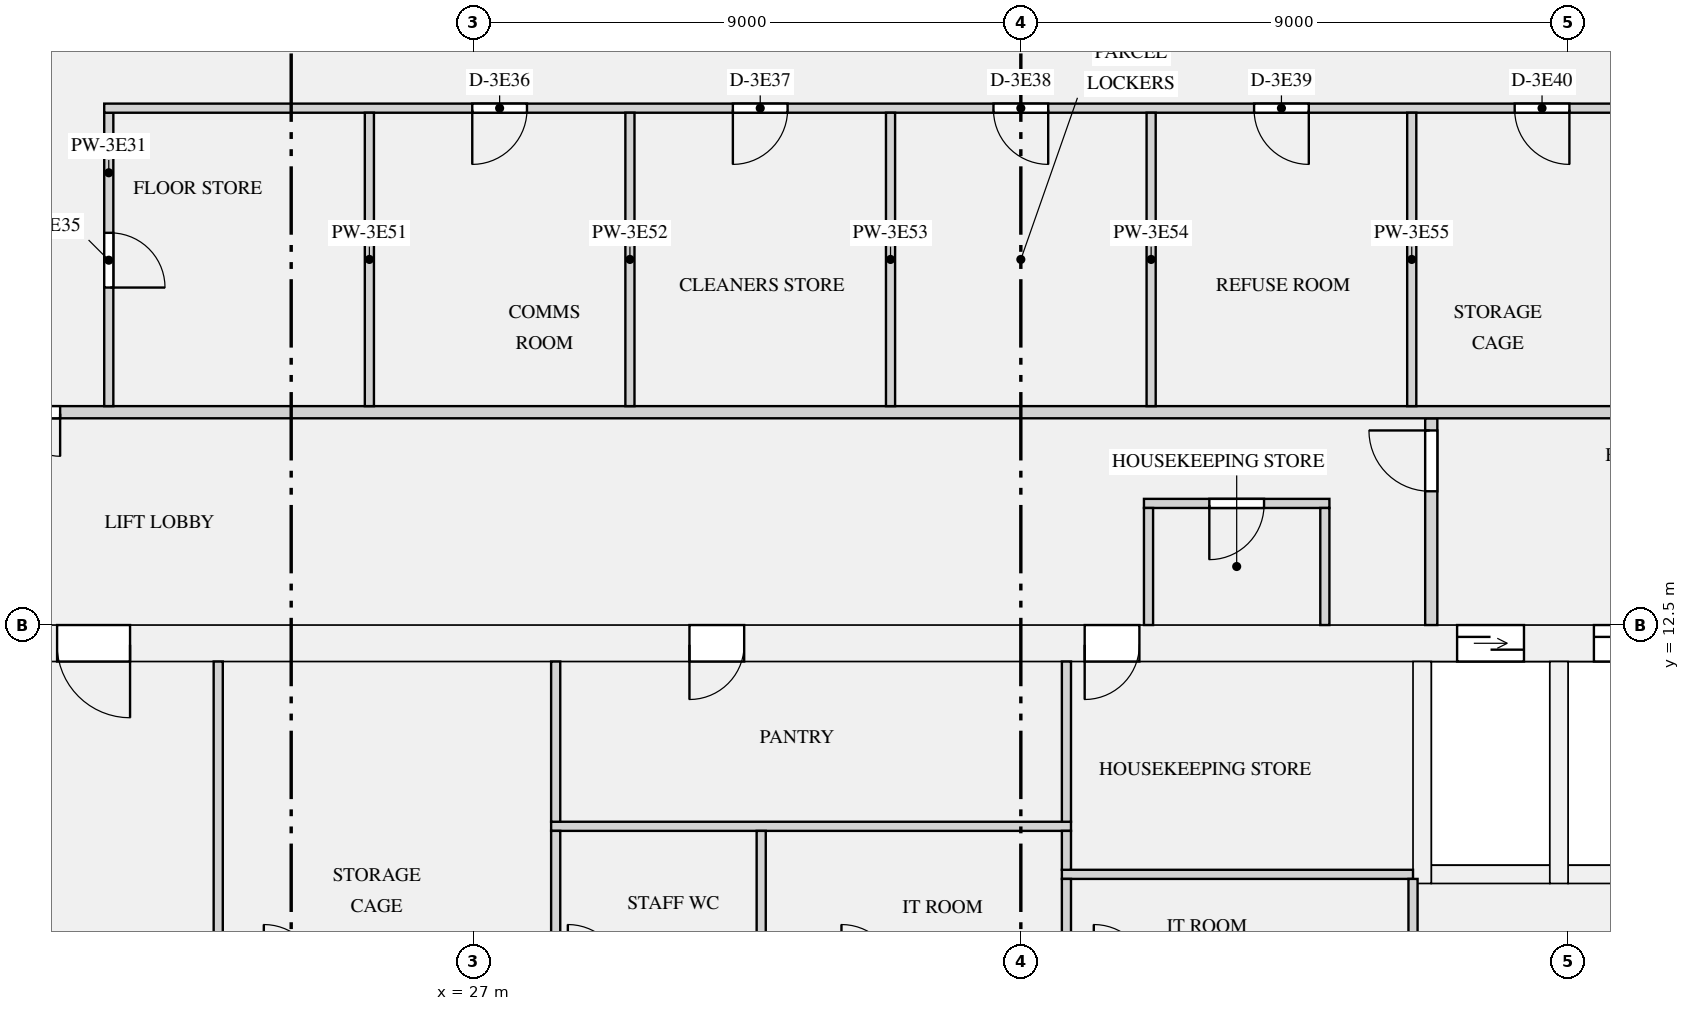
"""IFC4 building model, lengths in metres.
Left out: names, types, materials, properties, quantities, classifications, styles, units other than length and angle.
Written with IfcOpenShell. Run it as: python <this file> out.ifc"""

import sys

from ifc_helpers import new_model, si_unit, direction, frame, frame_2d, origin, place, context, subcontext, project, spatial, rectangle, extrude, element, fill, save


model = new_model("IFC4")
c1 = context("Model", 3, precision=1e-05, world=origin(), true_north=direction((0.0, 1.0)))
c2 = subcontext(c1, "Body", "Model", "MODEL_VIEW")
j1 = project(units=[si_unit("LENGTHUNIT", "METRE"), si_unit("PLANEANGLEUNIT", "RADIAN")], contexts=[c1])
p1 = place(None, origin())
s1 = spatial("IfcSite", under=j1, at=p1, CompositionType="ELEMENT")
p2 = place(p1, origin())
s2 = spatial("IfcBuilding", under=s1, at=p2, CompositionType="ELEMENT")
p3 = place(p2, frame((0.0, 0.0, 172.8)))
s3 = spatial("IfcBuildingStorey", under=s2, at=p3, CompositionType="ELEMENT", Elevation=172.8)
p4 = place(p3, frame((18.7, 12.2, 0.0), z_axis=(0.0, 0.0, 1.0), x_axis=(1.0, 0.0, 0.0)))
e1 = element("IfcWall", 1, at=p4, inside=s3, PredefinedType="SHEAR", context=c2, shape_type="SweptSolid", body=[
    extrude(rectangle(XDim=34.6, YDim=0.6, at=frame_2d((17.3, 0.0))), origin(), (0.0, 0.0, 1.0), 3.15),
])
p5 = place(p4, frame((24.475, 0.0, 0.0)))
e2 = element("IfcOpeningElement", 2, at=p5, cuts=e1, PredefinedType="OPENING", context=c2, shape_type="SweptSolid", body=[
    extrude(rectangle(XDim=1.1, YDim=2.1, at=frame_2d((0.55, 1.05))), frame((0.0, 0.31, 0.0), z_axis=(0.0, -1.0, 0.0), x_axis=(1.0, 0.0, 0.0)), (0.0, 0.0, 1.0), 0.62),
])
p6 = place(p4, frame((26.725, 0.0, 0.0)))
e3 = element("IfcOpeningElement", 3, at=p6, cuts=e1, PredefinedType="OPENING", context=c2, shape_type="SweptSolid", body=[
    extrude(rectangle(XDim=1.1, YDim=2.1, at=frame_2d((0.55, 1.05))), frame((0.0, 0.31, 0.0), z_axis=(0.0, -1.0, 0.0), x_axis=(1.0, 0.0, 0.0)), (0.0, 0.0, 1.0), 0.62),
])
p7 = place(p4, frame((28.975, 0.0, 0.0)))
e4 = element("IfcOpeningElement", 4, at=p7, cuts=e1, PredefinedType="OPENING", context=c2, shape_type="SweptSolid", body=[
    extrude(rectangle(XDim=1.1, YDim=2.1, at=frame_2d((0.55, 1.05))), frame((0.0, 0.31, 0.0), z_axis=(0.0, -1.0, 0.0), x_axis=(1.0, 0.0, 0.0)), (0.0, 0.0, 1.0), 0.62),
])
p8 = place(p4, frame((11.85, 0.0, 0.0)))
e5 = element("IfcOpeningElement", 5, at=p8, cuts=e1, PredefinedType="OPENING", context=c2, shape_type="SweptSolid", body=[
    extrude(rectangle(XDim=0.9, YDim=2.1, at=frame_2d((0.45, 1.05))), frame((0.0, 0.31, 0.0), z_axis=(0.0, -1.0, 0.0), x_axis=(1.0, 0.0, 0.0)), (0.0, 0.0, 1.0), 0.62),
])
p9 = place(p4, frame((18.35, 0.0, 0.0)))
e6 = element("IfcOpeningElement", 6, at=p9, cuts=e1, PredefinedType="OPENING", context=c2, shape_type="SweptSolid", body=[
    extrude(rectangle(XDim=0.9, YDim=2.1, at=frame_2d((0.45, 1.05))), frame((0.0, 0.31, 0.0), z_axis=(0.0, -1.0, 0.0), x_axis=(1.0, 0.0, 0.0)), (0.0, 0.0, 1.0), 0.62),
])
p10 = place(p4, frame((1.45, 0.0, 0.0)))
e7 = element("IfcOpeningElement", 7, at=p10, cuts=e1, PredefinedType="OPENING", context=c2, shape_type="SweptSolid", body=[
    extrude(rectangle(XDim=1.2, YDim=2.1, at=frame_2d((0.6, 1.05))), frame((0.0, 0.31, 0.0), z_axis=(0.0, -1.0, 0.0), x_axis=(1.0, 0.0, 0.0)), (0.0, 0.0, 1.0), 0.62),
])
p11 = place(p4, frame((31.95, 0.0, 0.0)))
e8 = element("IfcOpeningElement", 8, at=p11, cuts=e1, PredefinedType="OPENING", context=c2, shape_type="SweptSolid", body=[
    extrude(rectangle(XDim=1.2, YDim=2.1, at=frame_2d((0.6, 1.05))), frame((0.0, 0.31, 0.0), z_axis=(0.0, -1.0, 0.0), x_axis=(1.0, 0.0, 0.0)), (0.0, 0.0, 1.0), 0.62),
])
p12 = place(p3, frame((42.75, 8.4, 0.0), z_axis=(0.0, 0.0, 1.0), x_axis=(1.0, 0.0, 0.0)))
e9 = element("IfcWall", 9, at=p12, inside=s3, PredefinedType="SHEAR", context=c2, shape_type="SweptSolid", body=[
    extrude(rectangle(XDim=1.95, YDim=0.3, at=frame_2d((0.975, 0.0))), origin(), (0.0, 0.0, 1.0), 3.15),
])
p13 = place(p3, frame((42.6, 8.25, 0.0), z_axis=(0.0, 0.0, 1.0), x_axis=(0.0, 1.0, 0.0)))
e10 = element("IfcWall", 10, at=p13, inside=s3, PredefinedType="SHEAR", context=c2, shape_type="SweptSolid", body=[
    extrude(rectangle(XDim=3.65, YDim=0.3, at=frame_2d((1.825, 0.0))), origin(), (0.0, 0.0, 1.0), 3.15),
])
p14 = place(p3, frame((45.0, 8.4, 0.0), z_axis=(0.0, 0.0, 1.0), x_axis=(1.0, 0.0, 0.0)))
e11 = element("IfcWall", 11, at=p14, inside=s3, PredefinedType="SHEAR", context=c2, shape_type="SweptSolid", body=[
    extrude(rectangle(XDim=1.95, YDim=0.3, at=frame_2d((0.975, 0.0))), origin(), (0.0, 0.0, 1.0), 3.15),
])
p15 = place(p3, frame((44.85, 8.25, 0.0), z_axis=(0.0, 0.0, 1.0), x_axis=(0.0, 1.0, 0.0)))
e12 = element("IfcWall", 12, at=p15, inside=s3, PredefinedType="SHEAR", context=c2, shape_type="SweptSolid", body=[
    extrude(rectangle(XDim=3.65, YDim=0.3, at=frame_2d((1.825, 0.0))), origin(), (0.0, 0.0, 1.0), 3.15),
])
p16 = place(p3, frame((36.675, 8.4, 0.0), z_axis=(0.0, 0.0, 1.0), x_axis=(1.0, 0.0, 0.0)))
e13 = element("IfcWall", 13, at=p16, inside=s3, PredefinedType="PARTITIONING", context=c2, shape_type="SweptSolid", body=[
    extrude(rectangle(XDim=5.775, YDim=0.15, at=frame_2d((2.887, 0.0))), origin(), (0.0, 0.0, 1.0), 2.83),
])
p17 = place(p3, frame((28.275, 9.19, 0.0), z_axis=(0.0, 0.0, 1.0), x_axis=(1.0, 0.0, 0.0)))
e14 = element("IfcWall", 14, at=p17, inside=s3, PredefinedType="PARTITIONING", context=c2, shape_type="SweptSolid", body=[
    extrude(rectangle(XDim=8.55, YDim=0.15, at=frame_2d((4.275, 0.0))), origin(), (0.0, 0.0, 1.0), 2.83),
])
p18 = place(p3, frame((38.025, 14.5, 0.0), z_axis=(0.0, 0.0, 1.0), x_axis=(1.0, 0.0, 0.0)))
e15 = element("IfcWall", 15, at=p18, inside=s3, PredefinedType="PARTITIONING", context=c2, shape_type="SweptSolid", body=[
    extrude(rectangle(XDim=3.05, YDim=0.15, at=frame_2d((1.525, 0.0))), origin(), (0.0, 0.0, 1.0), 2.83),
])
p19 = place(p18, frame((1.075, 0.0, 0.0)))
e16 = element("IfcOpeningElement", 16, at=p19, cuts=e15, PredefinedType="OPENING", context=c2, shape_type="SweptSolid", body=[
    extrude(rectangle(XDim=0.9, YDim=2.1, at=frame_2d((0.45, 1.05))), frame((0.0, 0.085, 0.0), z_axis=(0.0, -1.0, 0.0), x_axis=(1.0, 0.0, 0.0)), (0.0, 0.0, 1.0), 0.17),
])
p20 = place(p3, frame((42.45, 6.65, 0.0), z_axis=(0.0, 0.0, 1.0), x_axis=(0.0, 1.0, 0.0)))
e17 = element("IfcWall", 17, at=p20, inside=s3, PredefinedType="PARTITIONING", context=c2, shape_type="SweptSolid", body=[
    extrude(rectangle(XDim=1.675, YDim=0.15, at=frame_2d((0.837, 0.0))), origin(), (0.0, 0.0, 1.0), 2.83),
])
p21 = place(p3, frame((22.8, 6.725, 0.0), z_axis=(0.0, 0.0, 1.0), x_axis=(0.0, 1.0, 0.0)))
e18 = element("IfcWall", 18, at=p21, inside=s3, PredefinedType="PARTITIONING", context=c2, shape_type="SweptSolid", body=[
    extrude(rectangle(XDim=5.175, YDim=0.15, at=frame_2d((2.587, 0.0))), origin(), (0.0, 0.0, 1.0), 2.83),
])
for number, where, z_axis, x_axis in (
    (19, (28.35, 6.725, 0.0), (0.0, 0.0, 1.0), (0.0, 1.0, 0.0)),
    (20, (31.73, 6.725, 0.0), (0.0, 0.0, 1.0), (0.0, 1.0, 0.0)),
):
    element("IfcWall", number, at=place(p3, frame(where, z_axis=z_axis, x_axis=x_axis)), inside=s3, PredefinedType="PARTITIONING", context=c2, shape_type="SweptSolid", body=[
        extrude(rectangle(XDim=2.39, YDim=0.15, at=frame_2d((1.195, 0.0))), origin(), (0.0, 0.0, 1.0), 2.83),
    ])
p22 = place(p3, frame((36.75, 6.725, 0.0), z_axis=(0.0, 0.0, 1.0), x_axis=(0.0, 1.0, 0.0)))
e21 = element("IfcWall", 21, at=p22, inside=s3, PredefinedType="PARTITIONING", context=c2, shape_type="SweptSolid", body=[
    extrude(rectangle(XDim=1.6, YDim=0.15, at=frame_2d((0.8, 0.0))), origin(), (0.0, 0.0, 1.0), 2.83),
])
p23 = place(p3, frame((36.75, 8.475, 0.0), z_axis=(0.0, 0.0, 1.0), x_axis=(0.0, 1.0, 0.0)))
e22 = element("IfcWall", 22, at=p23, inside=s3, PredefinedType="PARTITIONING", context=c2, shape_type="SweptSolid", body=[
    extrude(rectangle(XDim=0.64, YDim=0.15, at=frame_2d((0.32, 0.0))), origin(), (0.0, 0.0, 1.0), 2.83),
])
for number, where, z_axis, x_axis in (
    (23, (28.35, 9.265, 0.0), (0.0, 0.0, 1.0), (0.0, 1.0, 0.0)),
    (24, (36.75, 9.265, 0.0), (0.0, 0.0, 1.0), (0.0, 1.0, 0.0)),
):
    element("IfcWall", number, at=place(p3, frame(where, z_axis=z_axis, x_axis=x_axis)), inside=s3, PredefinedType="PARTITIONING", context=c2, shape_type="SweptSolid", body=[
        extrude(rectangle(XDim=2.635, YDim=0.15, at=frame_2d((1.317, 0.0))), origin(), (0.0, 0.0, 1.0), 2.83),
    ])
for number, where, z_axis, x_axis in (
    (25, (38.1, 12.5, 0.0), (0.0, 0.0, 1.0), (0.0, 1.0, 0.0)),
    (26, (41.0, 12.5, 0.0), (0.0, 0.0, 1.0), (0.0, 1.0, 0.0)),
):
    element("IfcWall", number, at=place(p3, frame(where, z_axis=z_axis, x_axis=x_axis)), inside=s3, PredefinedType="PARTITIONING", context=c2, shape_type="SweptSolid", body=[
        extrude(rectangle(XDim=1.925, YDim=0.15, at=frame_2d((0.962, 0.0))), origin(), (0.0, 0.0, 1.0), 2.83),
    ])
p24 = place(p3, frame((42.75, 12.5, 0.0), z_axis=(0.0, 0.0, 1.0), x_axis=(0.0, 1.0, 0.0)))
e27 = element("IfcWall", 27, at=p24, inside=s3, PredefinedType="PARTITIONING", context=c2, shape_type="SweptSolid", body=[
    extrude(rectangle(XDim=3.4, YDim=0.2, at=frame_2d((1.7, 0.0))), origin(), (0.0, 0.0, 1.0), 2.83),
])
p25 = place(p24, frame((2.2, 0.0, 0.0)))
e28 = element("IfcOpeningElement", 28, at=p25, cuts=e27, PredefinedType="OPENING", context=c2, shape_type="SweptSolid", body=[
    extrude(rectangle(XDim=1.0, YDim=2.1, at=frame_2d((0.5, 1.05))), frame((0.0, 0.11, 0.0), z_axis=(0.0, -1.0, 0.0), x_axis=(1.0, 0.0, 0.0)), (0.0, 0.0, 1.0), 0.22),
])
p26 = place(p3, frame((20.925, 21.0, 0.0), z_axis=(0.0, 0.0, 1.0), x_axis=(1.0, 0.0, 0.0)))
e29 = element("IfcWall", 29, at=p26, inside=s3, PredefinedType="PARTITIONING", context=c2, shape_type="SweptSolid", body=[
    extrude(rectangle(XDim=30.15, YDim=0.15, at=frame_2d((15.075, 0.0))), origin(), (0.0, 0.0, 1.0), 2.83),
])
p27 = place(p26, frame((6.053, 0.0, 0.0)))
e30 = element("IfcOpeningElement", 30, at=p27, cuts=e29, PredefinedType="OPENING", context=c2, shape_type="SweptSolid", body=[
    extrude(rectangle(XDim=0.9, YDim=2.1, at=frame_2d((0.45, 1.05))), frame((0.0, 0.085, 0.0), z_axis=(0.0, -1.0, 0.0), x_axis=(1.0, 0.0, 0.0)), (0.0, 0.0, 1.0), 0.17),
])
p28 = place(p26, frame((10.339, 0.0, 0.0)))
e31 = element("IfcOpeningElement", 31, at=p28, cuts=e29, PredefinedType="OPENING", context=c2, shape_type="SweptSolid", body=[
    extrude(rectangle(XDim=0.9, YDim=2.1, at=frame_2d((0.45, 1.05))), frame((0.0, 0.085, 0.0), z_axis=(0.0, -1.0, 0.0), x_axis=(1.0, 0.0, 0.0)), (0.0, 0.0, 1.0), 0.17),
])
p29 = place(p26, frame((14.625, 0.0, 0.0)))
e32 = element("IfcOpeningElement", 32, at=p29, cuts=e29, PredefinedType="OPENING", context=c2, shape_type="SweptSolid", body=[
    extrude(rectangle(XDim=0.9, YDim=2.1, at=frame_2d((0.45, 1.05))), frame((0.0, 0.085, 0.0), z_axis=(0.0, -1.0, 0.0), x_axis=(1.0, 0.0, 0.0)), (0.0, 0.0, 1.0), 0.17),
])
p30 = place(p26, frame((18.911, 0.0, 0.0)))
e33 = element("IfcOpeningElement", 33, at=p30, cuts=e29, PredefinedType="OPENING", context=c2, shape_type="SweptSolid", body=[
    extrude(rectangle(XDim=0.9, YDim=2.1, at=frame_2d((0.45, 1.05))), frame((0.0, 0.085, 0.0), z_axis=(0.0, -1.0, 0.0), x_axis=(1.0, 0.0, 0.0)), (0.0, 0.0, 1.0), 0.17),
])
p31 = place(p26, frame((23.197, 0.0, 0.0)))
e34 = element("IfcOpeningElement", 34, at=p31, cuts=e29, PredefinedType="OPENING", context=c2, shape_type="SweptSolid", body=[
    extrude(rectangle(XDim=0.9, YDim=2.1, at=frame_2d((0.45, 1.05))), frame((0.0, 0.085, 0.0), z_axis=(0.0, -1.0, 0.0), x_axis=(1.0, 0.0, 0.0)), (0.0, 0.0, 1.0), 0.17),
])
p32 = place(p3, frame((17.9, 16.0, 0.0), z_axis=(0.0, 0.0, 1.0), x_axis=(1.0, 0.0, 0.0)))
e35 = element("IfcWall", 35, at=p32, inside=s3, PredefinedType="PARTITIONING", context=c2, shape_type="SweptSolid", body=[
    extrude(rectangle(XDim=36.2, YDim=0.2, at=frame_2d((18.1, 0.0))), origin(), (0.0, 0.0, 1.0), 2.83),
])
p33 = place(p32, frame((0.9, 0.0, 0.0)))
e36 = element("IfcOpeningElement", 36, at=p33, cuts=e35, PredefinedType="OPENING", context=c2, shape_type="SweptSolid", body=[
    extrude(rectangle(XDim=1.4, YDim=2.1, at=frame_2d((0.7, 1.05))), frame((0.0, 0.11, 0.0), z_axis=(0.0, -1.0, 0.0), x_axis=(1.0, 0.0, 0.0)), (0.0, 0.0, 1.0), 0.22),
])
p34 = place(p32, frame((33.9, 0.0, 0.0)))
e37 = element("IfcOpeningElement", 37, at=p34, cuts=e35, PredefinedType="OPENING", context=c2, shape_type="SweptSolid", body=[
    extrude(rectangle(XDim=1.4, YDim=2.1, at=frame_2d((0.7, 1.05))), frame((0.0, 0.11, 0.0), z_axis=(0.0, -1.0, 0.0), x_axis=(1.0, 0.0, 0.0)), (0.0, 0.0, 1.0), 0.22),
])
p35 = place(p3, frame((21.0, 16.1, 0.0), z_axis=(0.0, 0.0, 1.0), x_axis=(0.0, 1.0, 0.0)))
e38 = element("IfcWall", 38, at=p35, inside=s3, PredefinedType="PARTITIONING", context=c2, shape_type="SweptSolid", body=[
    extrude(rectangle(XDim=4.825, YDim=0.15, at=frame_2d((2.413, 0.0))), origin(), (0.0, 0.0, 1.0), 2.83),
])
p36 = place(p35, frame((1.95, 0.0, 0.0)))
e39 = element("IfcOpeningElement", 39, at=p36, cuts=e38, PredefinedType="OPENING", context=c2, shape_type="SweptSolid", body=[
    extrude(rectangle(XDim=0.9, YDim=2.1, at=frame_2d((0.45, 1.05))), frame((0.0, 0.085, 0.0), z_axis=(0.0, -1.0, 0.0), x_axis=(1.0, 0.0, 0.0)), (0.0, 0.0, 1.0), 0.17),
])
for number, where, z_axis, x_axis in (
    (40, (25.286, 16.1, 0.0), (0.0, 0.0, 1.0), (0.0, 1.0, 0.0)),
    (41, (29.571, 16.1, 0.0), (0.0, 0.0, 1.0), (0.0, 1.0, 0.0)),
    (42, (33.857, 16.1, 0.0), (0.0, 0.0, 1.0), (0.0, 1.0, 0.0)),
    (43, (38.143, 16.1, 0.0), (0.0, 0.0, 1.0), (0.0, 1.0, 0.0)),
    (44, (42.429, 16.1, 0.0), (0.0, 0.0, 1.0), (0.0, 1.0, 0.0)),
):
    element("IfcWall", number, at=place(p3, frame(where, z_axis=z_axis, x_axis=x_axis)), inside=s3, PredefinedType="PARTITIONING", context=c2, shape_type="SweptSolid", body=[
        extrude(rectangle(XDim=4.825, YDim=0.15, at=frame_2d((2.413, 0.0))), origin(), (0.0, 0.0, 1.0), 2.83),
    ])
p37 = place(p5, origin())
e45 = element("IfcDoor", 45, at=p37, inside=s3, OperationType="DOUBLE_DOOR_SLIDING", PredefinedType="DOOR", context=c2, shape_type="SweptSolid", body=[
    extrude(rectangle(XDim=1.1, YDim=2.1, at=frame_2d((0.55, 1.05))), frame((0.0, 0.025, 0.0), z_axis=(0.0, -1.0, 0.0), x_axis=(1.0, 0.0, 0.0)), (0.0, 0.0, 1.0), 0.05),
])
fill(e2, e45)
p38 = place(p6, origin())
e46 = element("IfcDoor", 46, at=p38, inside=s3, OperationType="DOUBLE_DOOR_SLIDING", PredefinedType="DOOR", context=c2, shape_type="SweptSolid", body=[
    extrude(rectangle(XDim=1.1, YDim=2.1, at=frame_2d((0.55, 1.05))), frame((0.0, 0.025, 0.0), z_axis=(0.0, -1.0, 0.0), x_axis=(1.0, 0.0, 0.0)), (0.0, 0.0, 1.0), 0.05),
])
fill(e3, e46)
p39 = place(p19, frame((0.9, 0.0, 0.0), z_axis=(0.0, 0.0, 1.0), x_axis=(-1.0, 0.0, 0.0)))
e47 = element("IfcDoor", 47, at=p39, inside=s3, OperationType="SINGLE_SWING_RIGHT", PredefinedType="DOOR", context=c2, shape_type="SweptSolid", body=[
    extrude(rectangle(XDim=0.9, YDim=2.1, at=frame_2d((0.45, 1.05))), frame((0.0, 0.025, 0.0), z_axis=(0.0, -1.0, 0.0), x_axis=(1.0, 0.0, 0.0)), (0.0, 0.0, 1.0), 0.05),
])
fill(e16, e47)
p40 = place(p8, frame((0.9, 0.0, 0.0), z_axis=(0.0, 0.0, 1.0), x_axis=(-1.0, 0.0, 0.0)))
e48 = element("IfcDoor", 48, at=p40, inside=s3, OperationType="SINGLE_SWING_RIGHT", PredefinedType="DOOR", context=c2, shape_type="SweptSolid", body=[
    extrude(rectangle(XDim=0.9, YDim=2.1, at=frame_2d((0.45, 1.05))), frame((0.0, 0.025, 0.0), z_axis=(0.0, -1.0, 0.0), x_axis=(1.0, 0.0, 0.0)), (0.0, 0.0, 1.0), 0.05),
])
fill(e5, e48)
p41 = place(p9, frame((0.9, 0.0, 0.0), z_axis=(0.0, 0.0, 1.0), x_axis=(-1.0, 0.0, 0.0)))
e49 = element("IfcDoor", 49, at=p41, inside=s3, OperationType="SINGLE_SWING_RIGHT", PredefinedType="DOOR", context=c2, shape_type="SweptSolid", body=[
    extrude(rectangle(XDim=0.9, YDim=2.1, at=frame_2d((0.45, 1.05))), frame((0.0, 0.025, 0.0), z_axis=(0.0, -1.0, 0.0), x_axis=(1.0, 0.0, 0.0)), (0.0, 0.0, 1.0), 0.05),
])
fill(e6, e49)
p42 = place(p10, frame((1.2, 0.0, 0.0), z_axis=(0.0, 0.0, 1.0), x_axis=(-1.0, 0.0, 0.0)))
e50 = element("IfcDoor", 50, at=p42, inside=s3, OperationType="SINGLE_SWING_LEFT", PredefinedType="DOOR", context=c2, shape_type="SweptSolid", body=[
    extrude(rectangle(XDim=1.2, YDim=2.1, at=frame_2d((0.6, 1.05))), frame((0.0, 0.025, 0.0), z_axis=(0.0, -1.0, 0.0), x_axis=(1.0, 0.0, 0.0)), (0.0, 0.0, 1.0), 0.05),
])
fill(e7, e50)
p43 = place(p25, origin())
e51 = element("IfcDoor", 51, at=p43, inside=s3, OperationType="SINGLE_SWING_RIGHT", PredefinedType="DOOR", context=c2, shape_type="SweptSolid", body=[
    extrude(rectangle(XDim=1.0, YDim=2.1, at=frame_2d((0.5, 1.05))), frame((0.0, 0.025, 0.0), z_axis=(0.0, -1.0, 0.0), x_axis=(1.0, 0.0, 0.0)), (0.0, 0.0, 1.0), 0.05),
])
fill(e28, e51)
p44 = place(p33, frame((1.4, 0.0, 0.0), z_axis=(0.0, 0.0, 1.0), x_axis=(-1.0, 0.0, 0.0)))
e52 = element("IfcDoor", 52, at=p44, inside=s3, OperationType="DOUBLE_DOOR_SINGLE_SWING", PredefinedType="DOOR", context=c2, shape_type="SweptSolid", body=[
    extrude(rectangle(XDim=1.4, YDim=2.1, at=frame_2d((0.7, 1.05))), frame((0.0, 0.025, 0.0), z_axis=(0.0, -1.0, 0.0), x_axis=(1.0, 0.0, 0.0)), (0.0, 0.0, 1.0), 0.05),
])
fill(e36, e52)
p45 = place(p36, frame((0.9, 0.0, 0.0), z_axis=(0.0, 0.0, 1.0), x_axis=(-1.0, 0.0, 0.0)))
e53 = element("IfcDoor", 53, at=p45, inside=s3, OperationType="SINGLE_SWING_RIGHT", PredefinedType="DOOR", context=c2, shape_type="SweptSolid", body=[
    extrude(rectangle(XDim=0.9, YDim=2.1, at=frame_2d((0.45, 1.05))), frame((0.0, 0.025, 0.0), z_axis=(0.0, -1.0, 0.0), x_axis=(1.0, 0.0, 0.0)), (0.0, 0.0, 1.0), 0.05),
])
fill(e39, e53)
p46 = place(p27, frame((0.9, 0.0, 0.0), z_axis=(0.0, 0.0, 1.0), x_axis=(-1.0, 0.0, 0.0)))
e54 = element("IfcDoor", 54, at=p46, inside=s3, OperationType="SINGLE_SWING_RIGHT", PredefinedType="DOOR", context=c2, shape_type="SweptSolid", body=[
    extrude(rectangle(XDim=0.9, YDim=2.1, at=frame_2d((0.45, 1.05))), frame((0.0, 0.025, 0.0), z_axis=(0.0, -1.0, 0.0), x_axis=(1.0, 0.0, 0.0)), (0.0, 0.0, 1.0), 0.05),
])
fill(e30, e54)
p47 = place(p28, frame((0.9, 0.0, 0.0), z_axis=(0.0, 0.0, 1.0), x_axis=(-1.0, 0.0, 0.0)))
e55 = element("IfcDoor", 55, at=p47, inside=s3, OperationType="SINGLE_SWING_RIGHT", PredefinedType="DOOR", context=c2, shape_type="SweptSolid", body=[
    extrude(rectangle(XDim=0.9, YDim=2.1, at=frame_2d((0.45, 1.05))), frame((0.0, 0.025, 0.0), z_axis=(0.0, -1.0, 0.0), x_axis=(1.0, 0.0, 0.0)), (0.0, 0.0, 1.0), 0.05),
])
fill(e31, e55)
p48 = place(p29, frame((0.9, 0.0, 0.0), z_axis=(0.0, 0.0, 1.0), x_axis=(-1.0, 0.0, 0.0)))
e56 = element("IfcDoor", 56, at=p48, inside=s3, OperationType="SINGLE_SWING_LEFT", PredefinedType="DOOR", context=c2, shape_type="SweptSolid", body=[
    extrude(rectangle(XDim=0.9, YDim=2.1, at=frame_2d((0.45, 1.05))), frame((0.0, 0.025, 0.0), z_axis=(0.0, -1.0, 0.0), x_axis=(1.0, 0.0, 0.0)), (0.0, 0.0, 1.0), 0.05),
])
fill(e32, e56)
p49 = place(p30, frame((0.9, 0.0, 0.0), z_axis=(0.0, 0.0, 1.0), x_axis=(-1.0, 0.0, 0.0)))
e57 = element("IfcDoor", 57, at=p49, inside=s3, OperationType="SINGLE_SWING_LEFT", PredefinedType="DOOR", context=c2, shape_type="SweptSolid", body=[
    extrude(rectangle(XDim=0.9, YDim=2.1, at=frame_2d((0.45, 1.05))), frame((0.0, 0.025, 0.0), z_axis=(0.0, -1.0, 0.0), x_axis=(1.0, 0.0, 0.0)), (0.0, 0.0, 1.0), 0.05),
])
fill(e33, e57)
p50 = place(p31, frame((0.9, 0.0, 0.0), z_axis=(0.0, 0.0, 1.0), x_axis=(-1.0, 0.0, 0.0)))
e58 = element("IfcDoor", 58, at=p50, inside=s3, OperationType="SINGLE_SWING_LEFT", PredefinedType="DOOR", context=c2, shape_type="SweptSolid", body=[
    extrude(rectangle(XDim=0.9, YDim=2.1, at=frame_2d((0.45, 1.05))), frame((0.0, 0.025, 0.0), z_axis=(0.0, -1.0, 0.0), x_axis=(1.0, 0.0, 0.0)), (0.0, 0.0, 1.0), 0.05),
])
fill(e34, e58)
save(model, sys.argv[1])
